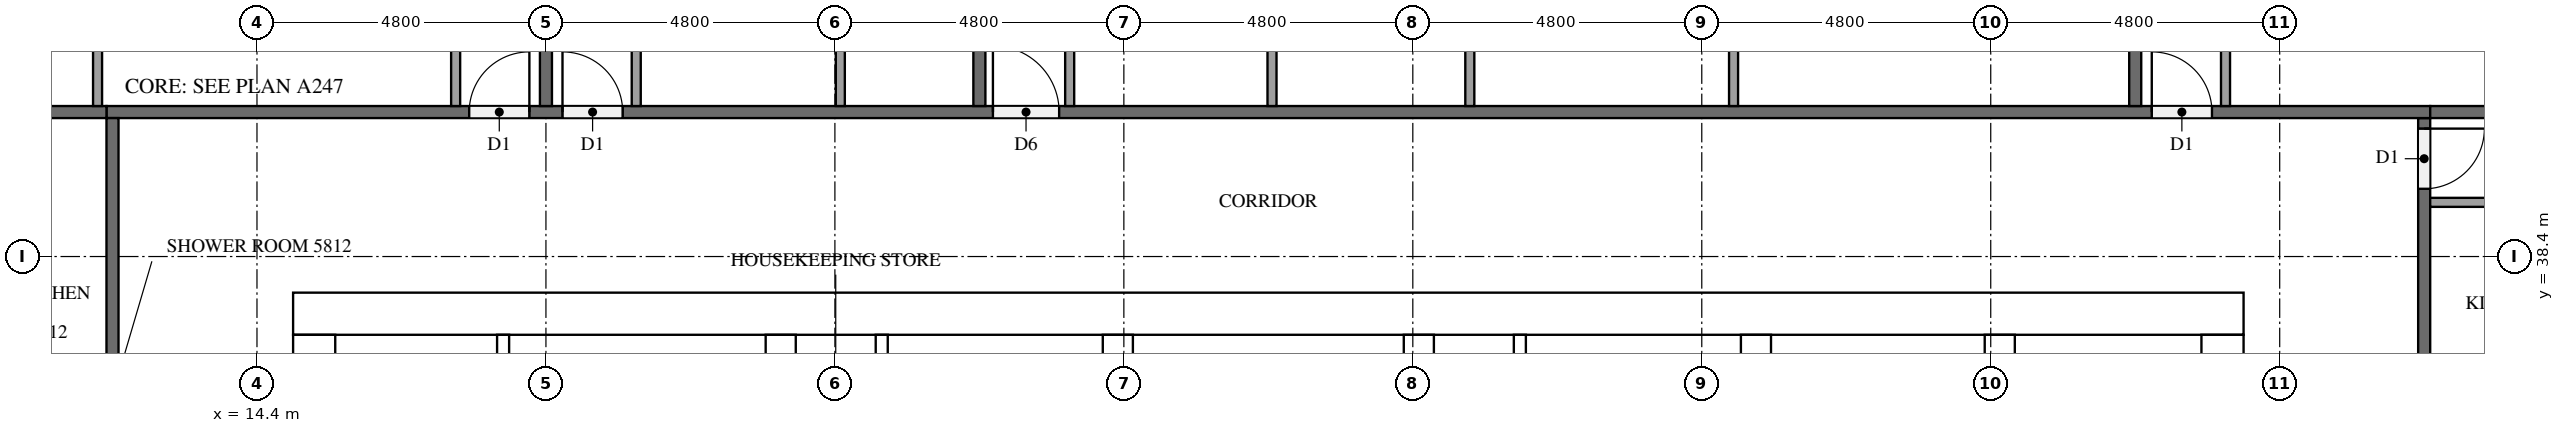
"""IFC4 building model, lengths in metres.
Left out: names, types, materials, properties, quantities, classifications, styles, units other than length and angle.
Written with IfcOpenShell. Run it as: python <this file> out.ifc"""

import sys

from ifc_helpers import new_model, si_unit, direction, frame, frame_2d, origin, place, context, subcontext, project, spatial, rectangle, extrude, element, fill, save


model = new_model("IFC4")
c1 = context("Model", 3, precision=1e-05, world=origin(), true_north=direction((0.0, 1.0)))
c2 = subcontext(c1, "Body", "Model", "MODEL_VIEW")
j1 = project(units=[si_unit("LENGTHUNIT", "METRE"), si_unit("PLANEANGLEUNIT", "RADIAN")], contexts=[c1])
p1 = place(None, origin())
s1 = spatial("IfcSite", under=j1, at=p1, CompositionType="ELEMENT")
p2 = place(p1, origin())
s2 = spatial("IfcBuilding", under=s1, at=p2, CompositionType="ELEMENT")
p3 = place(p2, frame((0.0, 0.0, 222.8)))
s3 = spatial("IfcBuildingStorey", under=s2, at=p3, CompositionType="ELEMENT", Elevation=222.8)
p4 = place(p3, frame((15.0, 37.45, 0.0), z_axis=(0.0, 0.0, 1.0), x_axis=(1.0, 0.0, 0.0)))
e1 = element("IfcWall", 1, at=p4, inside=s3, PredefinedType="SHEAR", context=c2, shape_type="SweptSolid", body=[
    extrude(rectangle(XDim=32.4, YDim=0.7, at=frame_2d((16.2, 0.0))), origin(), (0.0, 0.0, 1.0), 3.2),
])
p5 = place(p4, frame((15.3, 0.0, 0.0)))
e2 = element("IfcOpeningElement", 2, at=p5, cuts=e1, PredefinedType="OPENING", context=c2, shape_type="SweptSolid", body=[
    extrude(rectangle(XDim=1.8, YDim=2.1, at=frame_2d((0.9, 1.05))), frame((0.0, 0.36, 0.0), z_axis=(0.0, -1.0, 0.0), x_axis=(1.0, 0.0, 0.0)), (0.0, 0.0, 1.0), 0.72),
])
p6 = place(p4, frame((1.544, 0.0, 0.0)))
e3 = element("IfcOpeningElement", 3, at=p6, cuts=e1, PredefinedType="OPENING", context=c2, shape_type="SweptSolid", body=[
    extrude(rectangle(XDim=1.0, YDim=2.1, at=frame_2d((0.5, 1.05))), frame((0.0, 0.36, 0.0), z_axis=(0.0, -1.0, 0.0), x_axis=(1.0, 0.0, 0.0)), (0.0, 0.0, 1.0), 0.72),
])
p7 = place(p4, frame((5.219, 0.0, 0.0)))
e4 = element("IfcOpeningElement", 4, at=p7, cuts=e1, PredefinedType="OPENING", context=c2, shape_type="SweptSolid", body=[
    extrude(rectangle(XDim=1.0, YDim=2.1, at=frame_2d((0.5, 1.05))), frame((0.0, 0.36, 0.0), z_axis=(0.0, -1.0, 0.0), x_axis=(1.0, 0.0, 0.0)), (0.0, 0.0, 1.0), 0.72),
])
p8 = place(p3, frame((15.35, 15.7, 0.0), z_axis=(0.0, 0.0, 1.0), x_axis=(0.0, 1.0, 0.0)))
e5 = element("IfcWall", 5, at=p8, inside=s3, PredefinedType="SHEAR", context=c2, shape_type="SweptSolid", body=[
    extrude(rectangle(XDim=21.4, YDim=0.7, at=frame_2d((10.7, 0.0))), origin(), (0.0, 0.0, 1.0), 3.2),
])
p9 = place(p8, frame((5.06, 0.0, 0.0)))
e6 = element("IfcOpeningElement", 6, at=p9, cuts=e5, PredefinedType="OPENING", context=c2, shape_type="SweptSolid", body=[
    extrude(rectangle(XDim=1.2, YDim=2.1, at=frame_2d((0.6, 1.05))), frame((0.0, 0.36, 0.0), z_axis=(0.0, -1.0, 0.0), x_axis=(1.0, 0.0, 0.0)), (0.0, 0.0, 1.0), 0.72),
])
p10 = place(p3, frame((47.05, 15.7, 0.0), z_axis=(0.0, 0.0, 1.0), x_axis=(0.0, 1.0, 0.0)))
e7 = element("IfcWall", 7, at=p10, inside=s3, PredefinedType="SHEAR", context=c2, shape_type="SweptSolid", body=[
    extrude(rectangle(XDim=21.4, YDim=0.7, at=frame_2d((10.7, 0.0))), origin(), (0.0, 0.0, 1.0), 3.2),
])
p11 = place(p10, frame((10.4, 0.0, 0.0)))
e8 = element("IfcOpeningElement", 8, at=p11, cuts=e7, PredefinedType="OPENING", context=c2, shape_type="SweptSolid", body=[
    extrude(rectangle(XDim=1.2, YDim=2.1, at=frame_2d((0.6, 1.05))), frame((0.0, 0.36, 0.0), z_axis=(0.0, -1.0, 0.0), x_axis=(1.0, 0.0, 0.0)), (0.0, 0.0, 1.0), 0.72),
])
p12 = place(p3, frame((23.1, 15.7, 0.0), z_axis=(0.0, 0.0, 1.0), x_axis=(0.0, 1.0, 0.0)))
e9 = element("IfcWall", 9, at=p12, inside=s3, PredefinedType="SHEAR", context=c2, shape_type="SweptSolid", body=[
    extrude(rectangle(XDim=21.4, YDim=0.5, at=frame_2d((10.7, 0.0))), origin(), (0.0, 0.0, 1.0), 3.2),
])
p13 = place(p3, frame((39.3, 27.75, 0.0), z_axis=(0.0, 0.0, 1.0), x_axis=(0.0, 1.0, 0.0)))
e10 = element("IfcWall", 10, at=p13, inside=s3, PredefinedType="SHEAR", context=c2, shape_type="SweptSolid", body=[
    extrude(rectangle(XDim=9.35, YDim=0.5, at=frame_2d((4.675, 0.0))), origin(), (0.0, 0.0, 1.0), 3.2),
])
p14 = place(p3, frame((43.35, 27.75, 0.0), z_axis=(0.0, 0.0, 1.0), x_axis=(0.0, 1.0, 0.0)))
e11 = element("IfcWall", 11, at=p14, inside=s3, PredefinedType="SHEAR", context=c2, shape_type="SweptSolid", body=[
    extrude(rectangle(XDim=9.35, YDim=0.5, at=frame_2d((4.675, 0.0))), origin(), (0.0, 0.0, 1.0), 3.2),
])
p15 = place(p14, frame((7.65, 0.0, 0.0)))
e12 = element("IfcOpeningElement", 12, at=p15, cuts=e11, PredefinedType="OPENING", context=c2, shape_type="SweptSolid", body=[
    extrude(rectangle(XDim=1.2, YDim=2.1, at=frame_2d((0.6, 1.05))), frame((0.0, 0.26, 0.0), z_axis=(0.0, -1.0, 0.0), x_axis=(1.0, 0.0, 0.0)), (0.0, 0.0, 1.0), 0.52),
])
for number, where, z_axis, x_axis in (
    (13, (28.7, 33.8, 0.0), (0.0, 0.0, 1.0), (0.0, 1.0, 0.0)),
    (14, (33.7, 33.8, 0.0), (0.0, 0.0, 1.0), (0.0, 1.0, 0.0)),
):
    element("IfcWall", number, at=place(p3, frame(where, z_axis=z_axis, x_axis=x_axis)), inside=s3, PredefinedType="SHEAR", context=c2, shape_type="SweptSolid", body=[
        extrude(rectangle(XDim=3.3, YDim=0.5, at=frame_2d((1.65, 0.0))), origin(), (0.0, 0.0, 1.0), 3.2),
    ])
p16 = place(p3, frame((18.489, 31.5, 0.0), z_axis=(0.0, 0.0, 1.0), x_axis=(0.0, 1.0, 0.0)))
e15 = element("IfcWall", 15, at=p16, inside=s3, PredefinedType="PARTITIONING", context=c2, shape_type="SweptSolid", body=[
    extrude(rectangle(XDim=5.6, YDim=0.2, at=frame_2d((2.8, 0.0))), origin(), (0.0, 0.0, 1.0), 3.2),
])
for number, where, z_axis, x_axis in (
    (16, (24.778, 33.8, 0.0), (0.0, 0.0, 1.0), (0.0, 1.0, 0.0)),
    (17, (35.378, 33.8, 0.0), (0.0, 0.0, 1.0), (0.0, 1.0, 0.0)),
):
    element("IfcWall", number, at=place(p3, frame(where, z_axis=z_axis, x_axis=x_axis)), inside=s3, PredefinedType="PARTITIONING", context=c2, shape_type="SweptSolid", body=[
        extrude(rectangle(XDim=3.3, YDim=0.2, at=frame_2d((1.65, 0.0))), origin(), (0.0, 0.0, 1.0), 3.2),
    ])
p17 = place(p3, frame((50.4, 40.7, 0.0), z_axis=(0.0, 0.0, 1.0), x_axis=(0.0, -1.0, 0.0)))
e18 = element("IfcWall", 18, at=p17, inside=s3, PredefinedType="PARTITIONING", context=c2, shape_type="SweptSolid", body=[
    extrude(rectangle(XDim=28.6, YDim=0.2, at=frame_2d((14.3, 0.0))), origin(), (0.0, 0.0, 1.0), 3.2),
])
p18 = place(p17, frame((21.775, 0.0, 0.0)))
e19 = element("IfcOpeningElement", 19, at=p18, cuts=e18, PredefinedType="OPENING", context=c2, shape_type="SweptSolid", body=[
    extrude(rectangle(XDim=1.0, YDim=2.1, at=frame_2d((0.5, 1.05))), frame((0.0, 0.11, 0.0), z_axis=(0.0, -1.0, 0.0), x_axis=(1.0, 0.0, 0.0)), (0.0, 0.0, 1.0), 0.22),
])
p19 = place(p17, frame((7.375, 0.0, 0.0)))
e20 = element("IfcOpeningElement", 20, at=p19, cuts=e18, PredefinedType="OPENING", context=c2, shape_type="SweptSolid", body=[
    extrude(rectangle(XDim=1.0, YDim=2.1, at=frame_2d((0.5, 1.05))), frame((0.0, 0.11, 0.0), z_axis=(0.0, -1.0, 0.0), x_axis=(1.0, 0.0, 0.0)), (0.0, 0.0, 1.0), 0.22),
])
p20 = place(p17, frame((0.175, 0.0, 0.0)))
e21 = element("IfcOpeningElement", 21, at=p20, cuts=e18, PredefinedType="OPENING", context=c2, shape_type="SweptSolid", body=[
    extrude(rectangle(XDim=1.0, YDim=2.1, at=frame_2d((0.5, 1.05))), frame((0.0, 0.11, 0.0), z_axis=(0.0, -1.0, 0.0), x_axis=(1.0, 0.0, 0.0)), (0.0, 0.0, 1.0), 0.22),
])
p21 = place(p3, frame((11.9, 40.8, 0.0), z_axis=(0.0, 0.0, 1.0), x_axis=(1.0, 0.0, 0.0)))
e22 = element("IfcWall", 22, at=p21, inside=s3, PredefinedType="PARTITIONING", context=c2, shape_type="SweptSolid", body=[
    extrude(rectangle(XDim=38.6, YDim=0.2, at=frame_2d((19.3, 0.0))), origin(), (0.0, 0.0, 1.0), 3.2),
])
p22 = place(p21, frame((33.975, 0.0, 0.0)))
e23 = element("IfcOpeningElement", 23, at=p22, cuts=e22, PredefinedType="OPENING", context=c2, shape_type="SweptSolid", body=[
    extrude(rectangle(XDim=1.0, YDim=2.1, at=frame_2d((0.5, 1.05))), frame((0.0, 0.11, 0.0), z_axis=(0.0, -1.0, 0.0), x_axis=(1.0, 0.0, 0.0)), (0.0, 0.0, 1.0), 0.22),
])
p23 = place(p21, frame((14.725, 0.0, 0.0)))
e24 = element("IfcOpeningElement", 24, at=p23, cuts=e22, PredefinedType="OPENING", context=c2, shape_type="SweptSolid", body=[
    extrude(rectangle(XDim=1.1, YDim=2.1, at=frame_2d((0.55, 1.05))), frame((0.0, 0.11, 0.0), z_axis=(0.0, -1.0, 0.0), x_axis=(1.0, 0.0, 0.0)), (0.0, 0.0, 1.0), 0.22),
])
p24 = place(p21, frame((7.575, 0.0, 0.0)))
e25 = element("IfcOpeningElement", 25, at=p24, cuts=e22, PredefinedType="OPENING", context=c2, shape_type="SweptSolid", body=[
    extrude(rectangle(XDim=1.0, YDim=2.1, at=frame_2d((0.5, 1.05))), frame((0.0, 0.11, 0.0), z_axis=(0.0, -1.0, 0.0), x_axis=(1.0, 0.0, 0.0)), (0.0, 0.0, 1.0), 0.22),
])
p25 = place(p21, frame((6.025, 0.0, 0.0)))
e26 = element("IfcOpeningElement", 26, at=p25, cuts=e22, PredefinedType="OPENING", context=c2, shape_type="SweptSolid", body=[
    extrude(rectangle(XDim=1.0, YDim=2.1, at=frame_2d((0.5, 1.05))), frame((0.0, 0.11, 0.0), z_axis=(0.0, -1.0, 0.0), x_axis=(1.0, 0.0, 0.0)), (0.0, 0.0, 1.0), 0.22),
])
p26 = place(p3, frame((12.0, 12.1, 0.0), z_axis=(0.0, 0.0, 1.0), x_axis=(0.0, 1.0, 0.0)))
e27 = element("IfcWall", 27, at=p26, inside=s3, PredefinedType="PARTITIONING", context=c2, shape_type="SweptSolid", body=[
    extrude(rectangle(XDim=28.6, YDim=0.2, at=frame_2d((14.3, 0.0))), origin(), (0.0, 0.0, 1.0), 3.2),
])
p27 = place(p26, frame((9.725, 0.0, 0.0)))
e28 = element("IfcOpeningElement", 28, at=p27, cuts=e27, PredefinedType="OPENING", context=c2, shape_type="SweptSolid", body=[
    extrude(rectangle(XDim=1.1, YDim=2.1, at=frame_2d((0.55, 1.05))), frame((0.0, 0.11, 0.0), z_axis=(0.0, -1.0, 0.0), x_axis=(1.0, 0.0, 0.0)), (0.0, 0.0, 1.0), 0.22),
])
p28 = place(p26, frame((0.175, 0.0, 0.0)))
e29 = element("IfcOpeningElement", 29, at=p28, cuts=e27, PredefinedType="OPENING", context=c2, shape_type="SweptSolid", body=[
    extrude(rectangle(XDim=1.0, YDim=2.1, at=frame_2d((0.5, 1.05))), frame((0.0, 0.11, 0.0), z_axis=(0.0, -1.0, 0.0), x_axis=(1.0, 0.0, 0.0)), (0.0, 0.0, 1.0), 0.22),
])
for number, where, z_axis, x_axis in (
    (30, (50.5, 40.8, 0.0), (0.0, 0.0, 1.0), (1.0, 0.0, 0.0)),
    (31, (45.6, 52.7, 0.0), (0.0, 0.0, 1.0), (0.0, -1.0, 0.0)),
    (32, (26.4, 52.7, 0.0), (0.0, 0.0, 1.0), (0.0, -1.0, 0.0)),
):
    element("IfcWall", number, at=place(p3, frame(where, z_axis=z_axis, x_axis=x_axis)), inside=s3, PredefinedType="PARTITIONING", context=c2, shape_type="SweptSolid", body=[
        extrude(rectangle(XDim=11.8, YDim=0.2, at=frame_2d((5.9, 0.0))), origin(), (0.0, 0.0, 1.0), 3.2),
    ])
p29 = place(p3, frame((19.2, 52.475, 0.0), z_axis=(0.0, 0.0, 1.0), x_axis=(0.0, -1.0, 0.0)))
e33 = element("IfcWall", 33, at=p29, inside=s3, PredefinedType="PARTITIONING", context=c2, shape_type="SweptSolid", body=[
    extrude(rectangle(XDim=11.575, YDim=0.2, at=frame_2d((5.788, 0.0))), origin(), (0.0, 0.0, 1.0), 3.2),
])
p30 = place(p3, frame((4.9, 40.8, 0.0), z_axis=(0.0, 0.0, 1.0), x_axis=(1.0, 0.0, 0.0)))
e34 = element("IfcWall", 34, at=p30, inside=s3, PredefinedType="PARTITIONING", context=c2, shape_type="SweptSolid", body=[
    extrude(rectangle(XDim=7.0, YDim=0.2, at=frame_2d((3.5, 0.0))), origin(), (0.0, 0.0, 1.0), 3.2),
])
p31 = place(p3, frame((50.5, 39.3, 0.0), z_axis=(0.0, 0.0, 1.0), x_axis=(1.0, 0.0, 0.0)))
e35 = element("IfcWall", 35, at=p31, inside=s3, PredefinedType="PARTITIONING", context=c2, shape_type="SweptSolid", body=[
    extrude(rectangle(XDim=3.425, YDim=0.15, at=frame_2d((1.712, 0.0))), origin(), (0.0, 0.0, 1.0), 3.2),
])
p32 = place(p3, frame((47.1, 40.9, 0.0), z_axis=(0.0, 0.0, 1.0), x_axis=(0.0, 1.0, 0.0)))
e36 = element("IfcWall", 36, at=p32, inside=s3, PredefinedType="PARTITIONING", context=c2, shape_type="SweptSolid", body=[
    extrude(rectangle(XDim=3.125, YDim=0.15, at=frame_2d((1.562, 0.0))), origin(), (0.0, 0.0, 1.0), 3.2),
])
for number, where, z_axis, x_axis in (
    (37, (31.261, 40.9, 0.0), (0.0, 0.0, 1.0), (0.0, 1.0, 0.0)),
    (38, (34.547, 40.9, 0.0), (0.0, 0.0, 1.0), (0.0, 1.0, 0.0)),
    (39, (38.928, 40.9, 0.0), (0.0, 0.0, 1.0), (0.0, 1.0, 0.0)),
):
    element("IfcWall", number, at=place(p3, frame(where, z_axis=z_axis, x_axis=x_axis)), inside=s3, PredefinedType="PARTITIONING", context=c2, shape_type="SweptSolid", body=[
        extrude(rectangle(XDim=3.575, YDim=0.15, at=frame_2d((1.788, 0.0))), origin(), (0.0, 0.0, 1.0), 3.2),
    ])
for number, where, z_axis, x_axis in (
    (40, (27.9, 40.9, 0.0), (0.0, 0.0, 1.0), (0.0, 1.0, 0.0)),
    (41, (24.09, 40.9, 0.0), (0.0, 0.0, 1.0), (0.0, 1.0, 0.0)),
):
    element("IfcWall", number, at=place(p3, frame(where, z_axis=z_axis, x_axis=x_axis)), inside=s3, PredefinedType="PARTITIONING", context=c2, shape_type="SweptSolid", body=[
        extrude(rectangle(XDim=3.725, YDim=0.15, at=frame_2d((1.863, 0.0))), origin(), (0.0, 0.0, 1.0), 3.2),
    ])
p33 = place(p3, frame((20.7, 40.9, 0.0), z_axis=(0.0, 0.0, 1.0), x_axis=(0.0, 1.0, 0.0)))
e42 = element("IfcWall", 42, at=p33, inside=s3, PredefinedType="PARTITIONING", context=c2, shape_type="SweptSolid", body=[
    extrude(rectangle(XDim=3.875, YDim=0.15, at=frame_2d((1.938, 0.0))), origin(), (0.0, 0.0, 1.0), 3.2),
])
p34 = place(p3, frame((11.752, 40.9, 0.0), z_axis=(0.0, 0.0, 1.0), x_axis=(0.0, 1.0, 0.0)))
e43 = element("IfcWall", 43, at=p34, inside=s3, PredefinedType="PARTITIONING", context=c2, shape_type="SweptSolid", body=[
    extrude(rectangle(XDim=2.975, YDim=0.15, at=frame_2d((1.488, 0.0))), origin(), (0.0, 0.0, 1.0), 3.2),
])
p35 = place(p3, frame((17.7, 40.9, 0.0), z_axis=(0.0, 0.0, 1.0), x_axis=(0.0, 1.0, 0.0)))
e44 = element("IfcWall", 44, at=p35, inside=s3, PredefinedType="PARTITIONING", context=c2, shape_type="SweptSolid", body=[
    extrude(rectangle(XDim=3.125, YDim=0.15, at=frame_2d((1.562, 0.0))), origin(), (0.0, 0.0, 1.0), 3.2),
])
p36 = place(p5, origin())
e45 = element("IfcDoor", 45, at=p36, inside=s3, OperationType="DOUBLE_DOOR_SINGLE_SWING", PredefinedType="DOOR", context=c2, shape_type="SweptSolid", body=[
    extrude(rectangle(XDim=1.8, YDim=2.1, at=frame_2d((0.9, 1.05))), frame((0.0, 0.025, 0.0), z_axis=(0.0, -1.0, 0.0), x_axis=(1.0, 0.0, 0.0)), (0.0, 0.0, 1.0), 0.05),
])
fill(e2, e45)
p37 = place(p6, origin())
e46 = element("IfcDoor", 46, at=p37, inside=s3, OperationType="SINGLE_SWING_LEFT", PredefinedType="DOOR", context=c2, shape_type="SweptSolid", body=[
    extrude(rectangle(XDim=1.0, YDim=2.1, at=frame_2d((0.5, 1.05))), frame((0.0, 0.025, 0.0), z_axis=(0.0, -1.0, 0.0), x_axis=(1.0, 0.0, 0.0)), (0.0, 0.0, 1.0), 0.05),
])
fill(e3, e46)
p38 = place(p7, origin())
e47 = element("IfcDoor", 47, at=p38, inside=s3, OperationType="SINGLE_SWING_RIGHT", PredefinedType="DOOR", context=c2, shape_type="SweptSolid", body=[
    extrude(rectangle(XDim=1.0, YDim=2.1, at=frame_2d((0.5, 1.05))), frame((0.0, 0.025, 0.0), z_axis=(0.0, -1.0, 0.0), x_axis=(1.0, 0.0, 0.0)), (0.0, 0.0, 1.0), 0.05),
])
fill(e4, e47)
p39 = place(p20, origin())
e48 = element("IfcDoor", 48, at=p39, inside=s3, OperationType="SINGLE_SWING_LEFT", PredefinedType="DOOR", context=c2, shape_type="SweptSolid", body=[
    extrude(rectangle(XDim=1.0, YDim=2.1, at=frame_2d((0.5, 1.05))), frame((0.0, 0.025, 0.0), z_axis=(0.0, -1.0, 0.0), x_axis=(1.0, 0.0, 0.0)), (0.0, 0.0, 1.0), 0.05),
])
fill(e21, e48)
p40 = place(p22, origin())
e49 = element("IfcDoor", 49, at=p40, inside=s3, OperationType="SINGLE_SWING_LEFT", PredefinedType="DOOR", context=c2, shape_type="SweptSolid", body=[
    extrude(rectangle(XDim=1.0, YDim=2.1, at=frame_2d((0.5, 1.05))), frame((0.0, 0.025, 0.0), z_axis=(0.0, -1.0, 0.0), x_axis=(1.0, 0.0, 0.0)), (0.0, 0.0, 1.0), 0.05),
])
fill(e23, e49)
p41 = place(p23, origin())
e50 = element("IfcDoor", 50, at=p41, inside=s3, OperationType="SINGLE_SWING_LEFT", PredefinedType="DOOR", context=c2, shape_type="SweptSolid", body=[
    extrude(rectangle(XDim=1.1, YDim=2.1, at=frame_2d((0.55, 1.05))), frame((0.0, 0.025, 0.0), z_axis=(0.0, -1.0, 0.0), x_axis=(1.0, 0.0, 0.0)), (0.0, 0.0, 1.0), 0.05),
])
fill(e24, e50)
p42 = place(p24, origin())
e51 = element("IfcDoor", 51, at=p42, inside=s3, OperationType="SINGLE_SWING_LEFT", PredefinedType="DOOR", context=c2, shape_type="SweptSolid", body=[
    extrude(rectangle(XDim=1.0, YDim=2.1, at=frame_2d((0.5, 1.05))), frame((0.0, 0.025, 0.0), z_axis=(0.0, -1.0, 0.0), x_axis=(1.0, 0.0, 0.0)), (0.0, 0.0, 1.0), 0.05),
])
fill(e25, e51)
p43 = place(p25, origin())
e52 = element("IfcDoor", 52, at=p43, inside=s3, OperationType="SINGLE_SWING_RIGHT", PredefinedType="DOOR", context=c2, shape_type="SweptSolid", body=[
    extrude(rectangle(XDim=1.0, YDim=2.1, at=frame_2d((0.5, 1.05))), frame((0.0, 0.025, 0.0), z_axis=(0.0, -1.0, 0.0), x_axis=(1.0, 0.0, 0.0)), (0.0, 0.0, 1.0), 0.05),
])
fill(e26, e52)
save(model, sys.argv[1])
